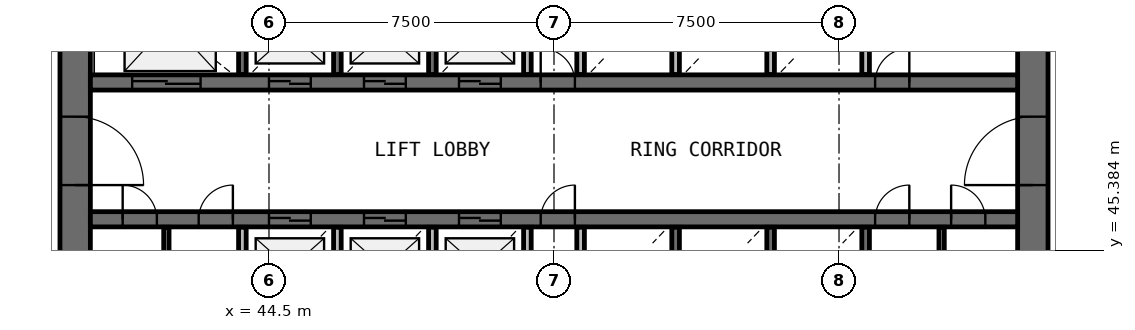
"""IFC4 building model, lengths in metres.
Left out: names, types, materials, properties, quantities, classifications, styles, units other than length and angle.
Written with IfcOpenShell. Run it as: python <this file> out.ifc"""

import sys

from ifc_helpers import new_model, si_unit, direction, frame, frame_2d, origin, place, context, subcontext, project, spatial, rectangle, extrude, source, transform, mapped, element, fill, save


model = new_model("IFC4")
c1 = context("Model", 3, precision=1e-05, world=origin(), true_north=direction((0.0, 1.0)))
c2 = subcontext(c1, "Body", "Model", "MODEL_VIEW")
j1 = project(units=[si_unit("LENGTHUNIT", "METRE"), si_unit("PLANEANGLEUNIT", "RADIAN")], contexts=[c1])
p1 = place(None, origin())
s1 = spatial("IfcSite", under=j1, at=p1, CompositionType="ELEMENT")
p2 = place(p1, origin())
s2 = spatial("IfcBuilding", under=s1, at=p2, CompositionType="ELEMENT")
p3 = place(p2, frame((0.0, 0.0, 96.2)))
s3 = spatial("IfcBuildingStorey", under=s2, at=p3, CompositionType="ELEMENT", Elevation=96.2)
p4 = place(p3, frame((64.6, 38.0, 0.0), z_axis=(0.0, 0.0, 1.0), x_axis=(0.0, 1.0, 0.0)))
e1 = element("IfcWall", 1, at=p4, inside=s3, PredefinedType="SHEAR", context=c2, shape_type="SweptSolid", body=[
    extrude(rectangle(XDim=20.0, YDim=0.8, at=frame_2d((10.0, 0.0))), origin(), (0.0, 0.0, 1.0), 4.1),
])
p5 = place(p4, frame((9.1, 0.0, 0.0)))
e2 = element("IfcOpeningElement", 2, at=p5, cuts=e1, PredefinedType="OPENING", context=c2, shape_type="SweptSolid", body=[
    extrude(rectangle(XDim=1.8, YDim=2.1, at=frame_2d((0.9, 1.05))), frame((0.0, 0.41, 0.0), z_axis=(0.0, -1.0, 0.0), x_axis=(1.0, 0.0, 0.0)), (0.0, 0.0, 1.0), 0.82),
])
p6 = place(p3, frame((39.4, 58.0, 0.0), z_axis=(0.0, 0.0, 1.0), x_axis=(0.0, -1.0, 0.0)))
e3 = element("IfcWall", 3, at=p6, inside=s3, PredefinedType="SHEAR", context=c2, shape_type="SweptSolid", body=[
    extrude(rectangle(XDim=20.0, YDim=0.8, at=frame_2d((10.0, 0.0))), origin(), (0.0, 0.0, 1.0), 4.1),
])
p7 = place(p6, frame((9.1, 0.0, 0.0)))
e4 = element("IfcOpeningElement", 4, at=p7, cuts=e3, PredefinedType="OPENING", context=c2, shape_type="SweptSolid", body=[
    extrude(rectangle(XDim=1.8, YDim=2.1, at=frame_2d((0.9, 1.05))), frame((0.0, 0.41, 0.0), z_axis=(0.0, -1.0, 0.0), x_axis=(1.0, 0.0, 0.0)), (0.0, 0.0, 1.0), 0.82),
])
p8 = place(p3, frame((39.8, 49.8, 0.0), z_axis=(0.0, 0.0, 1.0), x_axis=(1.0, 0.0, 0.0)))
e5 = element("IfcWall", 5, at=p8, inside=s3, PredefinedType="SHEAR", context=c2, shape_type="SweptSolid", body=[
    extrude(rectangle(XDim=24.4, YDim=0.4, at=frame_2d((12.2, 0.0))), origin(), (0.0, 0.0, 1.0), 4.1),
])
p9 = place(p8, frame((4.7, 0.0, 0.0)))
e6 = element("IfcOpeningElement", 6, at=p9, cuts=e5, PredefinedType="OPENING", context=c2, shape_type="SweptSolid", body=[
    extrude(rectangle(XDim=1.1, YDim=2.1, at=frame_2d((0.55, 1.05))), frame((0.0, 0.21, 0.0), z_axis=(0.0, -1.0, 0.0), x_axis=(1.0, 0.0, 0.0)), (0.0, 0.0, 1.0), 0.42),
])
p10 = place(p8, frame((7.2, 0.0, 0.0)))
e7 = element("IfcOpeningElement", 7, at=p10, cuts=e5, PredefinedType="OPENING", context=c2, shape_type="SweptSolid", body=[
    extrude(rectangle(XDim=1.1, YDim=2.1, at=frame_2d((0.55, 1.05))), frame((0.0, 0.21, 0.0), z_axis=(0.0, -1.0, 0.0), x_axis=(1.0, 0.0, 0.0)), (0.0, 0.0, 1.0), 0.42),
])
p11 = place(p8, frame((9.7, 0.0, 0.0)))
e8 = element("IfcOpeningElement", 8, at=p11, cuts=e5, PredefinedType="OPENING", context=c2, shape_type="SweptSolid", body=[
    extrude(rectangle(XDim=1.1, YDim=2.1, at=frame_2d((0.55, 1.05))), frame((0.0, 0.21, 0.0), z_axis=(0.0, -1.0, 0.0), x_axis=(1.0, 0.0, 0.0)), (0.0, 0.0, 1.0), 0.42),
])
p12 = place(p8, frame((1.1, 0.0, 0.0)))
e9 = element("IfcOpeningElement", 9, at=p12, cuts=e5, PredefinedType="OPENING", context=c2, shape_type="SweptSolid", body=[
    extrude(rectangle(XDim=1.8, YDim=2.4, at=frame_2d((0.9, 1.2))), frame((0.0, 0.21, 0.0), z_axis=(0.0, -1.0, 0.0), x_axis=(1.0, 0.0, 0.0)), (0.0, 0.0, 1.0), 0.42),
])
p13 = place(p8, frame((20.65, 0.0, 0.0)))
e10 = element("IfcOpeningElement", 10, at=p13, cuts=e5, PredefinedType="OPENING", context=c2, shape_type="SweptSolid", body=[
    extrude(rectangle(XDim=0.9, YDim=2.1, at=frame_2d((0.45, 1.05))), frame((0.0, 0.21, 0.0), z_axis=(0.0, -1.0, 0.0), x_axis=(1.0, 0.0, 0.0)), (0.0, 0.0, 1.0), 0.42),
])
p14 = place(p8, frame((11.85, 0.0, 0.0)))
e11 = element("IfcOpeningElement", 11, at=p14, cuts=e5, PredefinedType="OPENING", context=c2, shape_type="SweptSolid", body=[
    extrude(rectangle(XDim=0.9, YDim=2.1, at=frame_2d((0.45, 1.05))), frame((0.0, 0.21, 0.0), z_axis=(0.0, -1.0, 0.0), x_axis=(1.0, 0.0, 0.0)), (0.0, 0.0, 1.0), 0.42),
])
p15 = place(p3, frame((39.8, 46.2, 0.0), z_axis=(0.0, 0.0, 1.0), x_axis=(1.0, 0.0, 0.0)))
e12 = element("IfcWall", 12, at=p15, inside=s3, PredefinedType="SHEAR", context=c2, shape_type="SweptSolid", body=[
    extrude(rectangle(XDim=24.4, YDim=0.4, at=frame_2d((12.2, 0.0))), origin(), (0.0, 0.0, 1.0), 4.1),
])
p16 = place(p15, frame((4.7, 0.0, 0.0)))
e13 = element("IfcOpeningElement", 13, at=p16, cuts=e12, PredefinedType="OPENING", context=c2, shape_type="SweptSolid", body=[
    extrude(rectangle(XDim=1.1, YDim=2.1, at=frame_2d((0.55, 1.05))), frame((0.0, 0.21, 0.0), z_axis=(0.0, -1.0, 0.0), x_axis=(1.0, 0.0, 0.0)), (0.0, 0.0, 1.0), 0.42),
])
p17 = place(p15, frame((7.2, 0.0, 0.0)))
e14 = element("IfcOpeningElement", 14, at=p17, cuts=e12, PredefinedType="OPENING", context=c2, shape_type="SweptSolid", body=[
    extrude(rectangle(XDim=1.1, YDim=2.1, at=frame_2d((0.55, 1.05))), frame((0.0, 0.21, 0.0), z_axis=(0.0, -1.0, 0.0), x_axis=(1.0, 0.0, 0.0)), (0.0, 0.0, 1.0), 0.42),
])
p18 = place(p15, frame((9.7, 0.0, 0.0)))
e15 = element("IfcOpeningElement", 15, at=p18, cuts=e12, PredefinedType="OPENING", context=c2, shape_type="SweptSolid", body=[
    extrude(rectangle(XDim=1.1, YDim=2.1, at=frame_2d((0.55, 1.05))), frame((0.0, 0.21, 0.0), z_axis=(0.0, -1.0, 0.0), x_axis=(1.0, 0.0, 0.0)), (0.0, 0.0, 1.0), 0.42),
])
p19 = place(p15, frame((20.65, 0.0, 0.0)))
e16 = element("IfcOpeningElement", 16, at=p19, cuts=e12, PredefinedType="OPENING", context=c2, shape_type="SweptSolid", body=[
    extrude(rectangle(XDim=0.9, YDim=2.1, at=frame_2d((0.45, 1.05))), frame((0.0, 0.21, 0.0), z_axis=(0.0, -1.0, 0.0), x_axis=(1.0, 0.0, 0.0)), (0.0, 0.0, 1.0), 0.42),
])
p20 = place(p15, frame((22.65, 0.0, 0.0)))
e17 = element("IfcOpeningElement", 17, at=p20, cuts=e12, PredefinedType="OPENING", context=c2, shape_type="SweptSolid", body=[
    extrude(rectangle(XDim=0.9, YDim=2.1, at=frame_2d((0.45, 1.05))), frame((0.0, 0.21, 0.0), z_axis=(0.0, -1.0, 0.0), x_axis=(1.0, 0.0, 0.0)), (0.0, 0.0, 1.0), 0.42),
])
p21 = place(p15, frame((0.85, 0.0, 0.0)))
e18 = element("IfcOpeningElement", 18, at=p21, cuts=e12, PredefinedType="OPENING", context=c2, shape_type="SweptSolid", body=[
    extrude(rectangle(XDim=0.9, YDim=2.1, at=frame_2d((0.45, 1.05))), frame((0.0, 0.21, 0.0), z_axis=(0.0, -1.0, 0.0), x_axis=(1.0, 0.0, 0.0)), (0.0, 0.0, 1.0), 0.42),
])
p22 = place(p15, frame((2.85, 0.0, 0.0)))
e19 = element("IfcOpeningElement", 19, at=p22, cuts=e12, PredefinedType="OPENING", context=c2, shape_type="SweptSolid", body=[
    extrude(rectangle(XDim=0.9, YDim=2.1, at=frame_2d((0.45, 1.05))), frame((0.0, 0.21, 0.0), z_axis=(0.0, -1.0, 0.0), x_axis=(1.0, 0.0, 0.0)), (0.0, 0.0, 1.0), 0.42),
])
p23 = place(p15, frame((11.85, 0.0, 0.0)))
e20 = element("IfcOpeningElement", 20, at=p23, cuts=e12, PredefinedType="OPENING", context=c2, shape_type="SweptSolid", body=[
    extrude(rectangle(XDim=0.9, YDim=2.1, at=frame_2d((0.45, 1.05))), frame((0.0, 0.21, 0.0), z_axis=(0.0, -1.0, 0.0), x_axis=(1.0, 0.0, 0.0)), (0.0, 0.0, 1.0), 0.42),
])
for number, where, z_axis, x_axis in (
    (21, (43.8, 45.99, 0.0), (0.0, 0.0, 1.0), (0.0, -1.0, 0.0)),
    (22, (43.8, 52.37, 0.0), (0.0, 0.0, 1.0), (0.0, -1.0, 0.0)),
):
    element("IfcWall", number, at=place(p3, frame(where, z_axis=z_axis, x_axis=x_axis)), inside=s3, PredefinedType="SOLIDWALL", context=c2, shape_type="SweptSolid", body=[
        extrude(rectangle(XDim=2.36, YDim=0.2, at=frame_2d((1.18, 0.0))), origin(), (0.0, 0.0, 1.0), 3.7),
    ])
p24 = place(p3, frame((46.3, 43.6, 0.0), z_axis=(0.0, 0.0, 1.0), x_axis=(0.0, 1.0, 0.0)))
e23 = element("IfcWall", 23, at=p24, inside=s3, PredefinedType="SOLIDWALL", context=c2, shape_type="SweptSolid", body=[
    extrude(rectangle(XDim=2.39, YDim=0.2, at=frame_2d((1.195, 0.0))), origin(), (0.0, 0.0, 1.0), 3.7),
])
for number, where, z_axis, x_axis in (
    (24, (46.3, 50.01, 0.0), (0.0, 0.0, 1.0), (0.0, 1.0, 0.0)),
    (25, (48.8, 43.63, 0.0), (0.0, 0.0, 1.0), (0.0, 1.0, 0.0)),
    (26, (48.8, 50.01, 0.0), (0.0, 0.0, 1.0), (0.0, 1.0, 0.0)),
    (27, (51.3, 43.63, 0.0), (0.0, 0.0, 1.0), (0.0, 1.0, 0.0)),
):
    element("IfcWall", number, at=place(p3, frame(where, z_axis=z_axis, x_axis=x_axis)), inside=s3, PredefinedType="SOLIDWALL", context=c2, shape_type="SweptSolid", body=[
        extrude(rectangle(XDim=2.36, YDim=0.2, at=frame_2d((1.18, 0.0))), origin(), (0.0, 0.0, 1.0), 3.7),
    ])
for number, where, z_axis, x_axis in (
    (28, (51.3, 50.01, 0.0), (0.0, 0.0, 1.0), (0.0, 1.0, 0.0)),
    (29, (52.7, 45.99, 0.0), (0.0, 0.0, 1.0), (0.0, -1.0, 0.0)),
):
    element("IfcWall", number, at=place(p3, frame(where, z_axis=z_axis, x_axis=x_axis)), inside=s3, PredefinedType="SOLIDWALL", context=c2, shape_type="SweptSolid", body=[
        extrude(rectangle(XDim=2.39, YDim=0.2, at=frame_2d((1.195, 0.0))), origin(), (0.0, 0.0, 1.0), 3.7),
    ])
for number, where, z_axis, x_axis in (
    (30, (52.7, 52.37, 0.0), (0.0, 0.0, 1.0), (0.0, -1.0, 0.0)),
    (31, (55.2, 43.63, 0.0), (0.0, 0.0, 1.0), (0.0, 1.0, 0.0)),
    (32, (55.2, 50.01, 0.0), (0.0, 0.0, 1.0), (0.0, 1.0, 0.0)),
    (33, (57.7, 43.63, 0.0), (0.0, 0.0, 1.0), (0.0, 1.0, 0.0)),
):
    element("IfcWall", number, at=place(p3, frame(where, z_axis=z_axis, x_axis=x_axis)), inside=s3, PredefinedType="SOLIDWALL", context=c2, shape_type="SweptSolid", body=[
        extrude(rectangle(XDim=2.36, YDim=0.2, at=frame_2d((1.18, 0.0))), origin(), (0.0, 0.0, 1.0), 3.7),
    ])
p25 = place(p3, frame((57.7, 50.01, 0.0), z_axis=(0.0, 0.0, 1.0), x_axis=(0.0, 1.0, 0.0)))
e34 = element("IfcWall", 34, at=p25, inside=s3, PredefinedType="SOLIDWALL", context=c2, shape_type="SweptSolid", body=[
    extrude(rectangle(XDim=2.39, YDim=0.2, at=frame_2d((1.195, 0.0))), origin(), (0.0, 0.0, 1.0), 3.7),
])
for number, where, z_axis, x_axis in (
    (35, (60.2, 43.63, 0.0), (0.0, 0.0, 1.0), (0.0, 1.0, 0.0)),
    (36, (60.2, 50.01, 0.0), (0.0, 0.0, 1.0), (0.0, 1.0, 0.0)),
):
    element("IfcWall", number, at=place(p3, frame(where, z_axis=z_axis, x_axis=x_axis)), inside=s3, PredefinedType="SOLIDWALL", context=c2, shape_type="SweptSolid", body=[
        extrude(rectangle(XDim=2.36, YDim=0.2, at=frame_2d((1.18, 0.0))), origin(), (0.0, 0.0, 1.0), 3.7),
    ])
for number, where, z_axis, x_axis in (
    (37, (41.8, 43.6, 0.0), (0.0, 0.0, 1.0), (0.0, 1.0, 0.0)),
    (38, (62.2, 43.6, 0.0), (0.0, 0.0, 1.0), (0.0, 1.0, 0.0)),
):
    element("IfcWall", number, at=place(p3, frame(where, z_axis=z_axis, x_axis=x_axis)), inside=s3, PredefinedType="PARTITIONING", context=c2, shape_type="SweptSolid", body=[
        extrude(rectangle(XDim=2.39, YDim=0.14, at=frame_2d((1.195, 0.0))), origin(), (0.0, 0.0, 1.0), 2.9),
    ])
m1 = source(origin(), c2, "Body", "SweptSolid", [
    extrude(rectangle(XDim=1.8, YDim=2.1, at=frame_2d((0.9, 1.05))), frame((0.0, 0.025, 0.0), z_axis=(0.0, -1.0, 0.0), x_axis=(1.0, 0.0, 0.0)), (0.0, 0.0, 1.0), 0.05),
])
p26 = place(p7, origin())
e39 = element("IfcDoor", 39, at=p26, inside=s3, OperationType="SINGLE_SWING_RIGHT", PredefinedType="DOOR", context=c2, shape_type="MappedRepresentation", body=[
    mapped(m1, transform((0.0, 0.0, 0.0), scale=1.0)),
])
fill(e4, e39)
p27 = place(p5, origin())
e40 = element("IfcDoor", 40, at=p27, inside=s3, OperationType="SINGLE_SWING_LEFT", PredefinedType="DOOR", context=c2, shape_type="MappedRepresentation", body=[
    mapped(m1, transform((0.0, 0.0, 0.0), scale=1.0)),
])
fill(e2, e40)
m2 = source(origin(), c2, "Body", "SweptSolid", [
    extrude(rectangle(XDim=1.1, YDim=2.1, at=frame_2d((0.55, 1.05))), frame((0.0, 0.025, 0.0), z_axis=(0.0, -1.0, 0.0), x_axis=(1.0, 0.0, 0.0)), (0.0, 0.0, 1.0), 0.05),
])
p28 = place(p9, origin())
e41 = element("IfcDoor", 41, at=p28, inside=s3, OperationType="DOUBLE_DOOR_SLIDING", PredefinedType="USERDEFINED", context=c2, shape_type="MappedRepresentation", body=[
    mapped(m2, transform((0.0, 0.0, 0.0), scale=1.0)),
])
fill(e6, e41)
p29 = place(p10, origin())
e42 = element("IfcDoor", 42, at=p29, inside=s3, OperationType="DOUBLE_DOOR_SLIDING", PredefinedType="USERDEFINED", context=c2, shape_type="MappedRepresentation", body=[
    mapped(m2, transform((0.0, 0.0, 0.0), scale=1.0)),
])
fill(e7, e42)
p30 = place(p11, origin())
e43 = element("IfcDoor", 43, at=p30, inside=s3, OperationType="DOUBLE_DOOR_SLIDING", PredefinedType="USERDEFINED", context=c2, shape_type="MappedRepresentation", body=[
    mapped(m2, transform((0.0, 0.0, 0.0), scale=1.0)),
])
fill(e8, e43)
p31 = place(p16, origin())
e44 = element("IfcDoor", 44, at=p31, inside=s3, OperationType="DOUBLE_DOOR_SLIDING", PredefinedType="USERDEFINED", context=c2, shape_type="MappedRepresentation", body=[
    mapped(m2, transform((0.0, 0.0, 0.0), scale=1.0)),
])
fill(e13, e44)
p32 = place(p17, origin())
e45 = element("IfcDoor", 45, at=p32, inside=s3, OperationType="DOUBLE_DOOR_SLIDING", PredefinedType="USERDEFINED", context=c2, shape_type="MappedRepresentation", body=[
    mapped(m2, transform((0.0, 0.0, 0.0), scale=1.0)),
])
fill(e14, e45)
p33 = place(p18, origin())
e46 = element("IfcDoor", 46, at=p33, inside=s3, OperationType="DOUBLE_DOOR_SLIDING", PredefinedType="USERDEFINED", context=c2, shape_type="MappedRepresentation", body=[
    mapped(m2, transform((0.0, 0.0, 0.0), scale=1.0)),
])
fill(e15, e46)
m3 = source(origin(), c2, "Body", "SweptSolid", [
    extrude(rectangle(XDim=1.8, YDim=2.4, at=frame_2d((0.9, 1.2))), frame((0.0, 0.025, 0.0), z_axis=(0.0, -1.0, 0.0), x_axis=(1.0, 0.0, 0.0)), (0.0, 0.0, 1.0), 0.05),
])
p34 = place(p12, origin())
e47 = element("IfcDoor", 47, at=p34, inside=s3, OperationType="DOUBLE_DOOR_SLIDING", PredefinedType="USERDEFINED", context=c2, shape_type="MappedRepresentation", body=[
    mapped(m3, transform((0.0, 0.0, 0.0), scale=1.0)),
])
fill(e9, e47)
m4 = source(origin(), c2, "Body", "SweptSolid", [
    extrude(rectangle(XDim=0.9, YDim=2.1, at=frame_2d((0.45, 1.05))), frame((0.0, 0.025, 0.0), z_axis=(0.0, -1.0, 0.0), x_axis=(1.0, 0.0, 0.0)), (0.0, 0.0, 1.0), 0.05),
])
p35 = place(p19, origin())
e48 = element("IfcDoor", 48, at=p35, inside=s3, OperationType="SINGLE_SWING_RIGHT", PredefinedType="DOOR", context=c2, shape_type="MappedRepresentation", body=[
    mapped(m4, transform((0.0, 0.0, 0.0), scale=1.0)),
])
fill(e16, e48)
p36 = place(p20, origin())
e49 = element("IfcDoor", 49, at=p36, inside=s3, OperationType="SINGLE_SWING_LEFT", PredefinedType="DOOR", context=c2, shape_type="MappedRepresentation", body=[
    mapped(m4, transform((0.0, 0.0, 0.0), scale=1.0)),
])
fill(e17, e49)
p37 = place(p13, origin())
e50 = element("IfcDoor", 50, at=p37, inside=s3, OperationType="SINGLE_SWING_RIGHT", PredefinedType="DOOR", context=c2, shape_type="MappedRepresentation", body=[
    mapped(m4, transform((0.0, 0.0, 0.0), scale=1.0)),
])
fill(e10, e50)
p38 = place(p21, origin())
e51 = element("IfcDoor", 51, at=p38, inside=s3, OperationType="SINGLE_SWING_LEFT", PredefinedType="DOOR", context=c2, shape_type="MappedRepresentation", body=[
    mapped(m4, transform((0.0, 0.0, 0.0), scale=1.0)),
])
fill(e18, e51)
p39 = place(p22, origin())
e52 = element("IfcDoor", 52, at=p39, inside=s3, OperationType="SINGLE_SWING_RIGHT", PredefinedType="DOOR", context=c2, shape_type="MappedRepresentation", body=[
    mapped(m4, transform((0.0, 0.0, 0.0), scale=1.0)),
])
fill(e19, e52)
p40 = place(p14, origin())
e53 = element("IfcDoor", 53, at=p40, inside=s3, OperationType="SINGLE_SWING_LEFT", PredefinedType="DOOR", context=c2, shape_type="MappedRepresentation", body=[
    mapped(m4, transform((0.0, 0.0, 0.0), scale=1.0)),
])
fill(e11, e53)
p41 = place(p23, origin())
e54 = element("IfcDoor", 54, at=p41, inside=s3, OperationType="SINGLE_SWING_RIGHT", PredefinedType="DOOR", context=c2, shape_type="MappedRepresentation", body=[
    mapped(m4, transform((0.0, 0.0, 0.0), scale=1.0)),
])
fill(e20, e54)
save(model, sys.argv[1])
